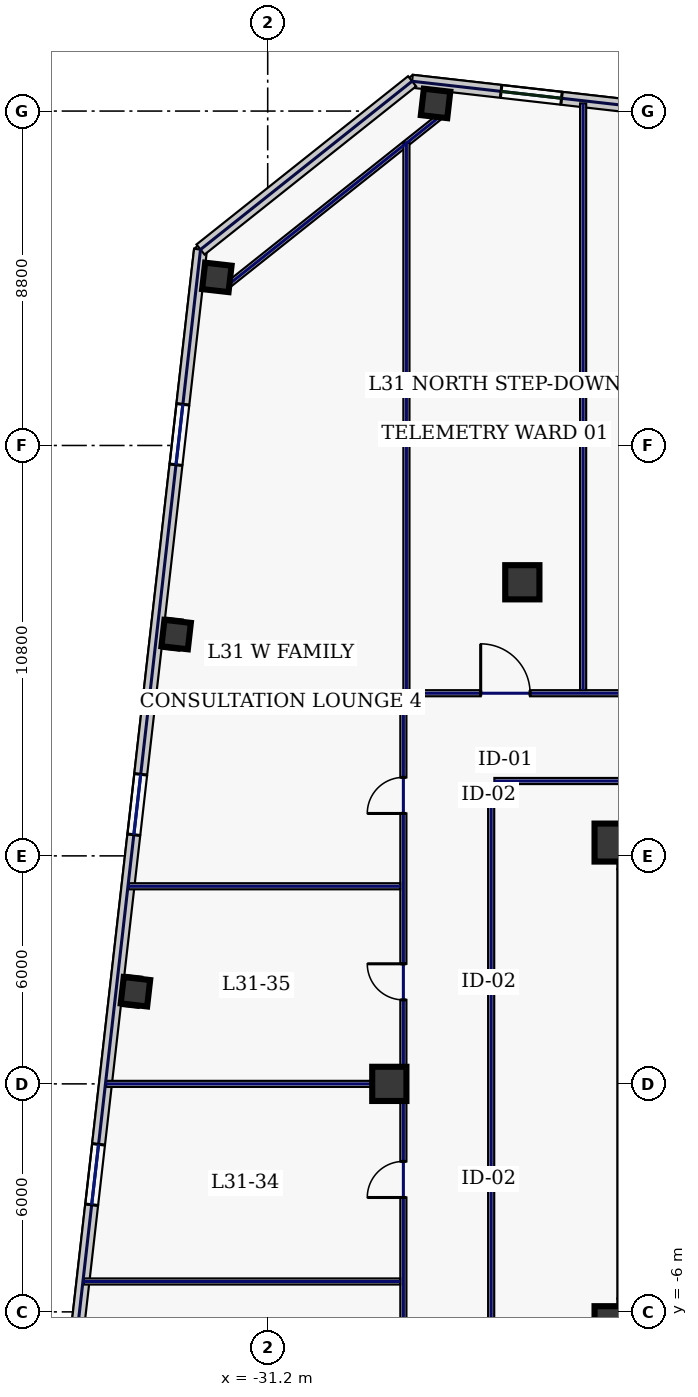
"""IFC4 building model, lengths in metres.
Left out: names, types, materials, properties, quantities, classifications, styles, units other than length and angle.
Written with IfcOpenShell. Run it as: python <this file> out.ifc"""

import sys

from ifc_helpers import new_model, si_unit, direction, frame, frame_2d, origin, origin_2d, place, context, subcontext, project, spatial, rectangle, hollow_rectangle, extrude, element, fill, save


model = new_model("IFC4")
c1 = context("Model", 3, precision=1e-05, world=origin(), true_north=direction((0.0, 1.0)))
c2 = subcontext(c1, "Body", "Model", "MODEL_VIEW")
j1 = project(units=[si_unit("LENGTHUNIT", "METRE"), si_unit("PLANEANGLEUNIT", "RADIAN")], contexts=[c1])
p1 = place(None, origin())
s1 = spatial("IfcSite", under=j1, at=p1, CompositionType="ELEMENT")
p2 = place(p1, origin())
s2 = spatial("IfcBuilding", under=s1, at=p2, CompositionType="ELEMENT")
p3 = place(p2, frame((0.0, 0.0, 137.4)))
s3 = spatial("IfcBuildingStorey", under=s2, at=p3, CompositionType="ELEMENT", Elevation=137.4)
for number, where, z_axis, x_axis in (
    (1, (-22.0, 6.0, 0.0), (0.0, 0.0, 1.0), (1.0, 0.0, 0.0)),
    (2, (-22.0, -6.0, 0.0), (0.0, 0.0, 1.0), (1.0, 0.0, 0.0)),
):
    element("IfcWall", number, at=place(p3, frame(where, z_axis=z_axis, x_axis=x_axis)), inside=s3, PredefinedType="SHEAR", context=c2, shape_type="SweptSolid", body=[
        extrude(rectangle(XDim=11.55, YDim=0.7, at=frame_2d((5.775, 0.0))), origin(), (0.0, 0.0, 1.0), 3.74),
    ])
p4 = place(p3, frame((-21.6, -5.65, 0.0), z_axis=(0.0, 0.0, 1.0), x_axis=(0.0, 1.0, 0.0)))
e3 = element("IfcWall", 3, at=p4, inside=s3, PredefinedType="SHEAR", context=c2, shape_type="SweptSolid", body=[
    extrude(rectangle(XDim=11.3, YDim=0.8, at=frame_2d((5.65, 0.0))), origin(), (0.0, 0.0, 1.0), 3.74),
])
for number, where, z_axis, x_axis in (
    (4, (-22.1, -6.35, 0.0), (0.0, 0.0, 1.0), (1.0, 0.0, 0.0)),
    (5, (-22.1, 6.35, 0.0), (0.0, 0.0, 1.0), (1.0, 0.0, 0.0)),
):
    element("IfcColumn", number, at=place(p3, frame(where, z_axis=z_axis, x_axis=x_axis)), inside=s3, PredefinedType="COLUMN", context=c2, shape_type="SweptSolid", body=[
        extrude(hollow_rectangle(XDim=1.0, YDim=1.0, WallThickness=0.045, at=origin_2d()), origin(), (0.0, 0.0, 1.0), 3.74),
    ])
for number, where, z_axis, x_axis in (
    (6, (-24.5, 13.2, 0.0), (0.0, 0.0, 1.0), (1.0, 0.0, 0.0)),
    (7, (-28.0, 0.0, 0.0), (0.0, 0.0, 1.0), (1.0, 0.0, 0.0)),
):
    element("IfcColumn", number, at=place(p3, frame(where, z_axis=z_axis, x_axis=x_axis)), inside=s3, PredefinedType="COLUMN", context=c2, shape_type="SweptSolid", body=[
        extrude(hollow_rectangle(XDim=0.9, YDim=0.9, WallThickness=0.04, at=origin_2d()), origin(), (0.0, 0.0, 1.0), 3.74),
    ])
for number, where, z_axis, x_axis in (
    (8, (-26.783, 25.801, 0.0), (0.0, 0.0, 1.0), (0.994, -0.113, 0.0)),
    (9, (-32.538, 21.223, 0.0), (0.0, 0.0, 1.0), (0.994, -0.113, 0.0)),
    (10, (-33.609, 11.824, 0.0), (0.0, 0.0, 1.0), (0.994, -0.113, 0.0)),
    (11, (-34.68, 2.425, 0.0), (0.0, 0.0, 1.0), (0.994, -0.113, 0.0)),
):
    element("IfcColumn", number, at=place(p3, frame(where, z_axis=z_axis, x_axis=x_axis)), inside=s3, PredefinedType="COLUMN", context=c2, shape_type="SweptSolid", body=[
        extrude(hollow_rectangle(XDim=0.7, YDim=0.7, WallThickness=0.032, at=origin_2d()), origin(), (0.0, 0.0, 1.0), 3.74),
    ])
p5 = place(p3, frame((-6.314, 23.982, 0.0), z_axis=(0.0, 0.0, 1.0), x_axis=(-0.993571362037, 0.113207546299, 0.0)))
e12 = element("IfcWall", 12, at=p5, inside=s3, PredefinedType="STANDARD", context=c2, shape_type="SweptSolid", body=[
    extrude(rectangle(XDim=21.223, YDim=0.34, at=frame_2d((10.611, 0.0))), origin(), (0.0, 0.0, 1.0), 3.74),
])
p6 = place(p5, frame((17.265, 0.0, 0.22)))
e13 = element("IfcOpeningElement", 13, at=p6, cuts=e12, PredefinedType="OPENING", context=c2, shape_type="SweptSolid", body=[
    extrude(rectangle(XDim=1.6, YDim=1.2, at=frame_2d((0.8, 0.6))), frame((0.0, 0.18, 0.0), z_axis=(0.0, -1.0, 0.0), x_axis=(1.0, 0.0, 0.0)), (0.0, 0.0, 1.0), 0.36),
])
p7 = place(p5, frame((12.794, 0.0, 0.67)))
e14 = element("IfcOpeningElement", 14, at=p7, cuts=e12, PredefinedType="OPENING", context=c2, shape_type="SweptSolid", body=[
    extrude(rectangle(XDim=2.1, YDim=2.2, at=frame_2d((1.05, 1.1))), frame((0.0, 0.18, 0.0), z_axis=(0.0, -1.0, 0.0), x_axis=(1.0, 0.0, 0.0)), (0.0, 0.0, 1.0), 0.36),
])
p8 = place(p5, frame((7.838, 0.0, 0.67)))
e15 = element("IfcOpeningElement", 15, at=p8, cuts=e12, PredefinedType="OPENING", context=c2, shape_type="SweptSolid", body=[
    extrude(rectangle(XDim=2.1, YDim=2.2, at=frame_2d((1.05, 1.1))), frame((0.0, 0.18, 0.0), z_axis=(0.0, -1.0, 0.0), x_axis=(1.0, 0.0, 0.0)), (0.0, 0.0, 1.0), 0.36),
])
p9 = place(p5, frame((3.616, 0.0, 0.67)))
e16 = element("IfcOpeningElement", 16, at=p9, cuts=e12, PredefinedType="OPENING", context=c2, shape_type="SweptSolid", body=[
    extrude(rectangle(XDim=0.85, YDim=1.85, at=frame_2d((0.425, 0.925))), frame((0.0, 0.18, 0.0), z_axis=(0.0, -1.0, 0.0), x_axis=(1.0, 0.0, 0.0)), (0.0, 0.0, 1.0), 0.36),
])
p10 = place(p3, frame((-32.968, 21.957, 0.0), z_axis=(0.0, 0.0, 1.0), x_axis=(-0.113201605824, -0.993572038877, 0.0)))
e17 = element("IfcWall", 17, at=p10, inside=s3, PredefinedType="STANDARD", context=c2, shape_type="SweptSolid", body=[
    extrude(rectangle(XDim=39.2, YDim=0.34, at=frame_2d((19.6, 0.0))), origin(), (0.0, 0.0, 1.0), 3.74),
])
p11 = place(p10, frame((4.1, 0.0, 0.58)))
e18 = element("IfcOpeningElement", 18, at=p11, cuts=e17, PredefinedType="OPENING", context=c2, shape_type="SweptSolid", body=[
    extrude(rectangle(XDim=1.6, YDim=2.3, at=frame_2d((0.8, 1.15))), frame((0.0, 0.18, 0.0), z_axis=(0.0, -1.0, 0.0), x_axis=(1.0, 0.0, 0.0)), (0.0, 0.0, 1.0), 0.36),
])
p12 = place(p10, frame((13.9, 0.0, 0.58)))
e19 = element("IfcOpeningElement", 19, at=p12, cuts=e17, PredefinedType="OPENING", context=c2, shape_type="SweptSolid", body=[
    extrude(rectangle(XDim=1.6, YDim=2.3, at=frame_2d((0.8, 1.15))), frame((0.0, 0.18, 0.0), z_axis=(0.0, -1.0, 0.0), x_axis=(1.0, 0.0, 0.0)), (0.0, 0.0, 1.0), 0.36),
])
p13 = place(p10, frame((23.7, 0.0, 0.58)))
e20 = element("IfcOpeningElement", 20, at=p13, cuts=e17, PredefinedType="OPENING", context=c2, shape_type="SweptSolid", body=[
    extrude(rectangle(XDim=1.6, YDim=2.3, at=frame_2d((0.8, 1.15))), frame((0.0, 0.18, 0.0), z_axis=(0.0, -1.0, 0.0), x_axis=(1.0, 0.0, 0.0)), (0.0, 0.0, 1.0), 0.36),
])
p14 = place(p10, frame((33.5, 0.0, 0.58)))
e21 = element("IfcOpeningElement", 21, at=p14, cuts=e17, PredefinedType="OPENING", context=c2, shape_type="SweptSolid", body=[
    extrude(rectangle(XDim=1.6, YDim=2.3, at=frame_2d((0.8, 1.15))), frame((0.0, 0.18, 0.0), z_axis=(0.0, -1.0, 0.0), x_axis=(1.0, 0.0, 0.0)), (0.0, 0.0, 1.0), 0.36),
])
p15 = place(p3, frame((-27.401, 26.385, 0.0), z_axis=(0.0, 0.0, 1.0), x_axis=(-0.78261359446, -0.622507800567, 0.0)))
e22 = element("IfcWall", 22, at=p15, inside=s3, PredefinedType="STANDARD", context=c2, shape_type="SweptSolid", body=[
    extrude(rectangle(XDim=7.114, YDim=0.34, at=frame_2d((3.557, 0.0))), origin(), (0.0, 0.0, 1.0), 3.74),
])
p16 = place(p3, frame((-26.571, 25.535, 0.0), z_axis=(0.0, 0.0, 1.0), x_axis=(-0.782617962887, -0.622502308564, 0.0)))
e23 = element("IfcWall", 23, at=p16, inside=s3, PredefinedType="PARTITIONING", context=c2, shape_type="SweptSolid", body=[
    extrude(rectangle(XDim=7.354, YDim=0.16, at=frame_2d((3.677, 0.0))), origin(), (0.0, 0.0, 1.0), 3.74),
])
p17 = place(p3, frame((-27.63, -10.015, 0.0), z_axis=(0.0, 0.0, 1.0), x_axis=(0.0, 1.0, 0.0)))
e24 = element("IfcWall", 24, at=p17, inside=s3, PredefinedType="PARTITIONING", context=c2, shape_type="SweptSolid", body=[
    extrude(rectangle(XDim=20.13, YDim=0.16, at=frame_2d((10.065, 0.0))), origin(), (0.0, 0.0, 1.0), 3.74),
])
p18 = place(p17, frame((2.169, 0.0, 0.0)))
e25 = element("IfcOpeningElement", 25, at=p18, cuts=e24, PredefinedType="OPENING", context=c2, shape_type="SweptSolid", body=[
    extrude(rectangle(XDim=0.95, YDim=2.2, at=frame_2d((0.475, 1.1))), frame((0.0, 0.09, 0.0), z_axis=(0.0, -1.0, 0.0), x_axis=(1.0, 0.0, 0.0)), (0.0, 0.0, 1.0), 0.18),
])
p19 = place(p17, frame((7.025, 0.0, 0.0)))
e26 = element("IfcOpeningElement", 26, at=p19, cuts=e24, PredefinedType="OPENING", context=c2, shape_type="SweptSolid", body=[
    extrude(rectangle(XDim=0.95, YDim=2.2, at=frame_2d((0.475, 1.1))), frame((0.0, 0.09, 0.0), z_axis=(0.0, -1.0, 0.0), x_axis=(1.0, 0.0, 0.0)), (0.0, 0.0, 1.0), 0.18),
])
p20 = place(p17, frame((12.225, 0.0, 0.0)))
e27 = element("IfcOpeningElement", 27, at=p20, cuts=e24, PredefinedType="OPENING", context=c2, shape_type="SweptSolid", body=[
    extrude(rectangle(XDim=0.95, YDim=2.2, at=frame_2d((0.475, 1.1))), frame((0.0, 0.09, 0.0), z_axis=(0.0, -1.0, 0.0), x_axis=(1.0, 0.0, 0.0)), (0.0, 0.0, 1.0), 0.18),
])
p21 = place(p17, frame((17.131, 0.0, 0.0)))
e28 = element("IfcOpeningElement", 28, at=p21, cuts=e24, PredefinedType="OPENING", context=c2, shape_type="SweptSolid", body=[
    extrude(rectangle(XDim=0.95, YDim=2.2, at=frame_2d((0.475, 1.1))), frame((0.0, 0.09, 0.0), z_axis=(0.0, -1.0, 0.0), x_axis=(1.0, 0.0, 0.0)), (0.0, 0.0, 1.0), 0.18),
])
p22 = place(p3, frame((-27.465, 10.28, 0.0), z_axis=(0.0, 0.0, 1.0), x_axis=(1.0, 0.0, 0.0)))
e29 = element("IfcWall", 29, at=p22, inside=s3, PredefinedType="PARTITIONING", context=c2, shape_type="SweptSolid", body=[
    extrude(rectangle(XDim=54.93, YDim=0.16, at=frame_2d((27.465, 0.0))), origin(), (0.0, 0.0, 1.0), 3.74),
])
p23 = place(p22, frame((1.869, 0.0, 0.0)))
e30 = element("IfcOpeningElement", 30, at=p23, cuts=e29, PredefinedType="OPENING", context=c2, shape_type="SweptSolid", body=[
    extrude(rectangle(XDim=1.3, YDim=2.2, at=frame_2d((0.65, 1.1))), frame((0.0, 0.09, 0.0), z_axis=(0.0, -1.0, 0.0), x_axis=(1.0, 0.0, 0.0)), (0.0, 0.0, 1.0), 0.18),
])
p24 = place(p22, frame((7.1, 0.0, 0.0)))
e31 = element("IfcOpeningElement", 31, at=p24, cuts=e29, PredefinedType="OPENING", context=c2, shape_type="SweptSolid", body=[
    extrude(rectangle(XDim=0.95, YDim=2.2, at=frame_2d((0.475, 1.1))), frame((0.0, 0.09, 0.0), z_axis=(0.0, -1.0, 0.0), x_axis=(1.0, 0.0, 0.0)), (0.0, 0.0, 1.0), 0.18),
])
p25 = place(p22, frame((12.5, 0.0, 0.0)))
e32 = element("IfcOpeningElement", 32, at=p25, cuts=e29, PredefinedType="OPENING", context=c2, shape_type="SweptSolid", body=[
    extrude(rectangle(XDim=0.95, YDim=2.2, at=frame_2d((0.475, 1.1))), frame((0.0, 0.09, 0.0), z_axis=(0.0, -1.0, 0.0), x_axis=(1.0, 0.0, 0.0)), (0.0, 0.0, 1.0), 0.18),
])
p26 = place(p22, frame((18.325, 0.0, 0.0)))
e33 = element("IfcOpeningElement", 33, at=p26, cuts=e29, PredefinedType="OPENING", context=c2, shape_type="SweptSolid", body=[
    extrude(rectangle(XDim=0.95, YDim=2.2, at=frame_2d((0.475, 1.1))), frame((0.0, 0.09, 0.0), z_axis=(0.0, -1.0, 0.0), x_axis=(1.0, 0.0, 0.0)), (0.0, 0.0, 1.0), 0.18),
])
p27 = place(p22, frame((24.575, 0.0, 0.0)))
e34 = element("IfcOpeningElement", 34, at=p27, cuts=e29, PredefinedType="OPENING", context=c2, shape_type="SweptSolid", body=[
    extrude(rectangle(XDim=0.95, YDim=2.2, at=frame_2d((0.475, 1.1))), frame((0.0, 0.09, 0.0), z_axis=(0.0, -1.0, 0.0), x_axis=(1.0, 0.0, 0.0)), (0.0, 0.0, 1.0), 0.18),
])
p28 = place(p22, frame((30.69, 0.0, 0.0)))
e35 = element("IfcOpeningElement", 35, at=p28, cuts=e29, PredefinedType="OPENING", context=c2, shape_type="SweptSolid", body=[
    extrude(rectangle(XDim=1.3, YDim=2.2, at=frame_2d((0.65, 1.1))), frame((0.0, 0.09, 0.0), z_axis=(0.0, -1.0, 0.0), x_axis=(1.0, 0.0, 0.0)), (0.0, 0.0, 1.0), 0.18),
])
p29 = place(p22, frame((37.02, 0.0, 0.0)))
e36 = element("IfcOpeningElement", 36, at=p29, cuts=e29, PredefinedType="OPENING", context=c2, shape_type="SweptSolid", body=[
    extrude(rectangle(XDim=1.3, YDim=2.2, at=frame_2d((0.65, 1.1))), frame((0.0, 0.09, 0.0), z_axis=(0.0, -1.0, 0.0), x_axis=(1.0, 0.0, 0.0)), (0.0, 0.0, 1.0), 0.18),
])
p30 = place(p22, frame((44.73, 0.0, 0.0)))
e37 = element("IfcOpeningElement", 37, at=p30, cuts=e29, PredefinedType="OPENING", context=c2, shape_type="SweptSolid", body=[
    extrude(rectangle(XDim=1.3, YDim=2.2, at=frame_2d((0.65, 1.1))), frame((0.0, 0.09, 0.0), z_axis=(0.0, -1.0, 0.0), x_axis=(1.0, 0.0, 0.0)), (0.0, 0.0, 1.0), 0.18),
])
p31 = place(p22, frame((51.956, 0.0, 0.0)))
e38 = element("IfcOpeningElement", 38, at=p31, cuts=e29, PredefinedType="OPENING", context=c2, shape_type="SweptSolid", body=[
    extrude(rectangle(XDim=0.95, YDim=2.2, at=frame_2d((0.475, 1.1))), frame((0.0, 0.09, 0.0), z_axis=(0.0, -1.0, 0.0), x_axis=(1.0, 0.0, 0.0)), (0.0, 0.0, 1.0), 0.18),
])
p32 = place(p3, frame((-10.665, 7.97, 0.0), z_axis=(0.0, 0.0, 1.0), x_axis=(-1.0, 0.0, 0.0)))
e39 = element("IfcWall", 39, at=p32, inside=s3, PredefinedType="PARTITIONING", context=c2, shape_type="SweptSolid", body=[
    extrude(rectangle(XDim=14.57, YDim=0.16, at=frame_2d((7.285, 0.0))), origin(), (0.0, 0.0, 1.0), 3.74),
])
p33 = place(p3, frame((-25.32, 7.885, 0.0), z_axis=(0.0, 0.0, 1.0), x_axis=(0.0, -1.0, 0.0)))
e40 = element("IfcWall", 40, at=p33, inside=s3, PredefinedType="PARTITIONING", context=c2, shape_type="SweptSolid", body=[
    extrude(rectangle(XDim=15.67, YDim=0.16, at=frame_2d((7.835, 0.0))), origin(), (0.0, 0.0, 1.0), 3.74),
])
p34 = place(p3, frame((-27.55, 10.365, 0.0), z_axis=(0.0, 0.0, 1.0), x_axis=(0.0, 1.0, 0.0)))
e41 = element("IfcWall", 41, at=p34, inside=s3, PredefinedType="PARTITIONING", context=c2, shape_type="SweptSolid", body=[
    extrude(rectangle(XDim=14.409, YDim=0.16, at=frame_2d((7.204, 0.0))), origin(), (0.0, 0.0, 1.0), 3.74),
])
p35 = place(p3, frame((-22.9, 10.365, 0.0), z_axis=(0.0, 0.0, 1.0), x_axis=(0.0, 1.0, 0.0)))
e42 = element("IfcWall", 42, at=p35, inside=s3, PredefinedType="PARTITIONING", context=c2, shape_type="SweptSolid", body=[
    extrude(rectangle(XDim=15.437, YDim=0.16, at=frame_2d((7.718, 0.0))), origin(), (0.0, 0.0, 1.0), 3.74),
])
p36 = place(p3, frame((-36.042, -5.2, 0.0), z_axis=(0.0, 0.0, 1.0), x_axis=(1.0, 0.0, 0.0)))
e43 = element("IfcWall", 43, at=p36, inside=s3, PredefinedType="PARTITIONING", context=c2, shape_type="SweptSolid", body=[
    extrude(rectangle(XDim=8.327, YDim=0.16, at=frame_2d((4.164, 0.0))), origin(), (0.0, 0.0, 1.0), 3.74),
])
p37 = place(p3, frame((-35.449, 0.0, 0.0), z_axis=(0.0, 0.0, 1.0), x_axis=(1.0, 0.0, 0.0)))
e44 = element("IfcWall", 44, at=p37, inside=s3, PredefinedType="PARTITIONING", context=c2, shape_type="SweptSolid", body=[
    extrude(rectangle(XDim=7.734, YDim=0.16, at=frame_2d((3.867, 0.0))), origin(), (0.0, 0.0, 1.0), 3.74),
])
p38 = place(p3, frame((-34.857, 5.2, 0.0), z_axis=(0.0, 0.0, 1.0), x_axis=(1.0, 0.0, 0.0)))
e45 = element("IfcWall", 45, at=p38, inside=s3, PredefinedType="PARTITIONING", context=c2, shape_type="SweptSolid", body=[
    extrude(rectangle(XDim=7.142, YDim=0.16, at=frame_2d((3.571, 0.0))), origin(), (0.0, 0.0, 1.0), 3.74),
])
p39 = place(p6, origin())
e46 = element("IfcWindow", 46, at=p39, inside=s3, PartitioningType="SINGLE_PANEL", PredefinedType="WINDOW", context=c2, shape_type="SweptSolid", body=[
    extrude(rectangle(XDim=1.6, YDim=1.2, at=frame_2d((0.8, 0.6))), frame((0.0, 0.03, 0.0), z_axis=(0.0, -1.0, 0.0), x_axis=(1.0, 0.0, 0.0)), (0.0, 0.0, 1.0), 0.06),
])
fill(e13, e46)
p40 = place(p11, origin())
e47 = element("IfcWindow", 47, at=p40, inside=s3, PartitioningType="SINGLE_PANEL", PredefinedType="WINDOW", context=c2, shape_type="SweptSolid", body=[
    extrude(rectangle(XDim=1.6, YDim=2.3, at=frame_2d((0.8, 1.15))), frame((0.0, 0.03, 0.0), z_axis=(0.0, -1.0, 0.0), x_axis=(1.0, 0.0, 0.0)), (0.0, 0.0, 1.0), 0.06),
])
fill(e18, e47)
p41 = place(p12, origin())
e48 = element("IfcWindow", 48, at=p41, inside=s3, PartitioningType="SINGLE_PANEL", PredefinedType="WINDOW", context=c2, shape_type="SweptSolid", body=[
    extrude(rectangle(XDim=1.6, YDim=2.3, at=frame_2d((0.8, 1.15))), frame((0.0, 0.03, 0.0), z_axis=(0.0, -1.0, 0.0), x_axis=(1.0, 0.0, 0.0)), (0.0, 0.0, 1.0), 0.06),
])
fill(e19, e48)
p42 = place(p13, origin())
e49 = element("IfcWindow", 49, at=p42, inside=s3, PartitioningType="SINGLE_PANEL", PredefinedType="WINDOW", context=c2, shape_type="SweptSolid", body=[
    extrude(rectangle(XDim=1.6, YDim=2.3, at=frame_2d((0.8, 1.15))), frame((0.0, 0.03, 0.0), z_axis=(0.0, -1.0, 0.0), x_axis=(1.0, 0.0, 0.0)), (0.0, 0.0, 1.0), 0.06),
])
fill(e20, e49)
p43 = place(p23, origin())
e50 = element("IfcDoor", 50, at=p43, inside=s3, OperationType="SINGLE_SWING_LEFT", PredefinedType="DOOR", context=c2, shape_type="SweptSolid", body=[
    extrude(rectangle(XDim=1.3, YDim=2.2, at=frame_2d((0.65, 1.1))), frame((0.0, 0.025, 0.0), z_axis=(0.0, -1.0, 0.0), x_axis=(1.0, 0.0, 0.0)), (0.0, 0.0, 1.0), 0.05),
])
fill(e30, e50)
p44 = place(p19, origin())
e51 = element("IfcDoor", 51, at=p44, inside=s3, OperationType="SINGLE_SWING_LEFT", PredefinedType="DOOR", context=c2, shape_type="SweptSolid", body=[
    extrude(rectangle(XDim=0.95, YDim=2.2, at=frame_2d((0.475, 1.1))), frame((0.0, 0.025, 0.0), z_axis=(0.0, -1.0, 0.0), x_axis=(1.0, 0.0, 0.0)), (0.0, 0.0, 1.0), 0.05),
])
fill(e26, e51)
p45 = place(p20, origin())
e52 = element("IfcDoor", 52, at=p45, inside=s3, OperationType="SINGLE_SWING_RIGHT", PredefinedType="DOOR", context=c2, shape_type="SweptSolid", body=[
    extrude(rectangle(XDim=0.95, YDim=2.2, at=frame_2d((0.475, 1.1))), frame((0.0, 0.025, 0.0), z_axis=(0.0, -1.0, 0.0), x_axis=(1.0, 0.0, 0.0)), (0.0, 0.0, 1.0), 0.05),
])
fill(e27, e52)
p46 = place(p21, origin())
e53 = element("IfcDoor", 53, at=p46, inside=s3, OperationType="SINGLE_SWING_LEFT", PredefinedType="DOOR", context=c2, shape_type="SweptSolid", body=[
    extrude(rectangle(XDim=0.95, YDim=2.2, at=frame_2d((0.475, 1.1))), frame((0.0, 0.025, 0.0), z_axis=(0.0, -1.0, 0.0), x_axis=(1.0, 0.0, 0.0)), (0.0, 0.0, 1.0), 0.05),
])
fill(e28, e53)
save(model, sys.argv[1])
